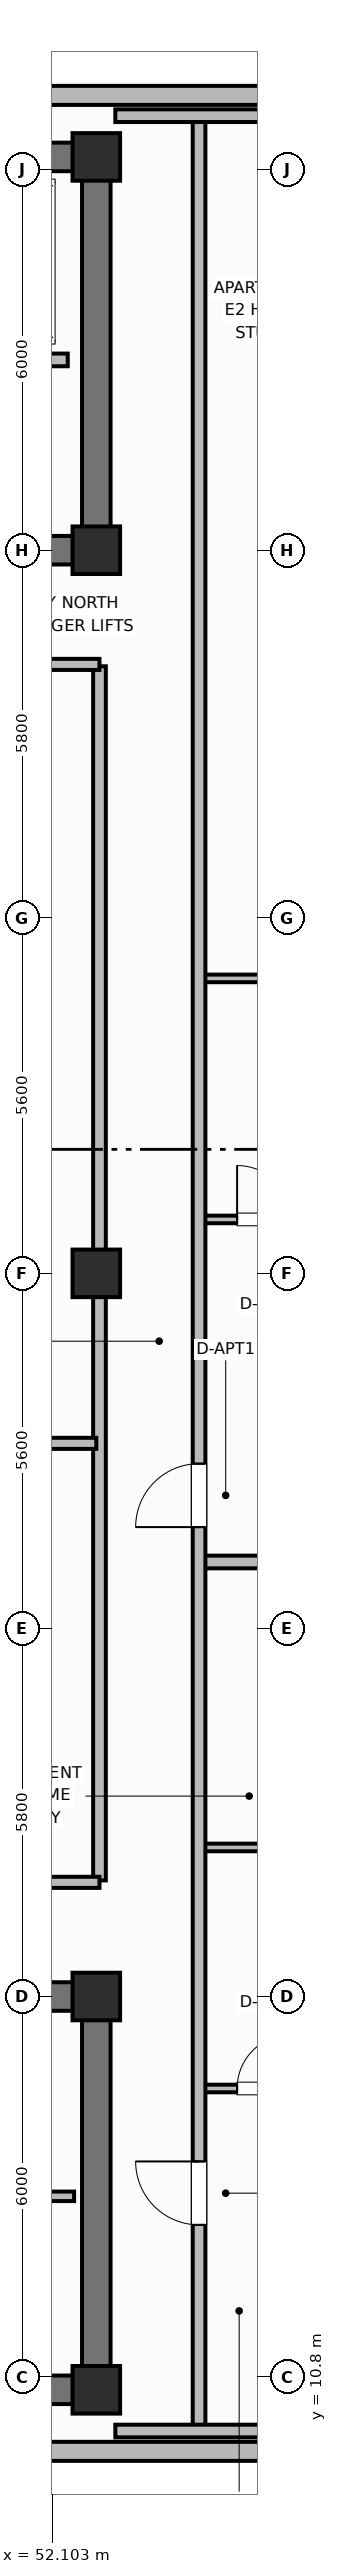
"""IFC4 building model, lengths in metres.
Left out: names, types, materials, properties, quantities, classifications, styles, units other than length and angle.
Written with IfcOpenShell. Run it as: python <this file> out.ifc"""

import sys

from ifc_helpers import new_model, si_unit, direction, frame, frame_2d, origin, origin_2d, place, context, subcontext, project, spatial, rectangle, extrude, element, fill, save


model = new_model("IFC4")
c1 = context("Model", 3, precision=1e-05, world=origin(), true_north=direction((0.0, 1.0)))
c2 = subcontext(c1, "Body", "Model", "MODEL_VIEW")
j1 = project(units=[si_unit("LENGTHUNIT", "METRE"), si_unit("PLANEANGLEUNIT", "RADIAN")], contexts=[c1])
p1 = place(None, origin())
s1 = spatial("IfcSite", under=j1, at=p1, CompositionType="ELEMENT")
p2 = place(p1, origin())
s2 = spatial("IfcBuilding", under=s1, at=p2, CompositionType="ELEMENT")
p3 = place(p2, frame((0.0, 0.0, 293.5)))
s3 = spatial("IfcBuildingStorey", under=s2, at=p3, CompositionType="ELEMENT", Elevation=293.5)
p4 = place(p3, frame((52.8, 10.6, 0.0), z_axis=(0.0, 0.0, 1.0), x_axis=(-1.0, 0.0, 0.0)))
e1 = element("IfcWall", 1, at=p4, inside=s3, PredefinedType="SHEAR", context=c2, shape_type="SweptSolid", body=[
    extrude(rectangle(XDim=27.2, YDim=0.45, at=frame_2d((13.6, 0.0))), origin(), (0.0, 0.0, 1.0), 3.7),
])
p5 = place(p3, frame((52.8, 10.825, 0.0), z_axis=(0.0, 0.0, 1.0), x_axis=(0.0, 1.0, 0.0)))
e2 = element("IfcWall", 2, at=p5, inside=s3, PredefinedType="SHEAR", context=c2, shape_type="SweptSolid", body=[
    extrude(rectangle(XDim=5.75, YDim=0.45, at=frame_2d((2.875, 0.0))), origin(), (0.0, 0.0, 1.0), 3.7),
])
p6 = place(p3, frame((25.6, 16.8, 0.0), z_axis=(0.0, 0.0, 1.0), x_axis=(1.0, 0.0, 0.0)))
e3 = element("IfcWall", 3, at=p6, inside=s3, PredefinedType="SHEAR", context=c2, shape_type="SweptSolid", body=[
    extrude(rectangle(XDim=27.2, YDim=0.45, at=frame_2d((13.6, 0.0))), origin(), (0.0, 0.0, 1.0), 3.7),
])
p7 = place(p6, frame((1.7, 0.0, 0.0)))
e4 = element("IfcOpeningElement", 4, at=p7, cuts=e3, PredefinedType="OPENING", context=c2, shape_type="SweptSolid", body=[
    extrude(rectangle(XDim=1.1, YDim=2.15, at=frame_2d((0.55, 1.075))), frame((0.0, 0.235, 0.0), z_axis=(0.0, -1.0, 0.0), x_axis=(1.0, 0.0, 0.0)), (0.0, 0.0, 1.0), 0.47),
])
p8 = place(p6, frame((4.45, 0.0, 0.0)))
e5 = element("IfcOpeningElement", 5, at=p8, cuts=e3, PredefinedType="OPENING", context=c2, shape_type="SweptSolid", body=[
    extrude(rectangle(XDim=0.85, YDim=2.1, at=frame_2d((0.425, 1.05))), frame((0.0, 0.235, 0.0), z_axis=(0.0, -1.0, 0.0), x_axis=(1.0, 0.0, 0.0)), (0.0, 0.0, 1.0), 0.47),
])
p9 = place(p6, frame((6.5, 0.0, 0.0)))
e6 = element("IfcOpeningElement", 6, at=p9, cuts=e3, PredefinedType="OPENING", context=c2, shape_type="SweptSolid", body=[
    extrude(rectangle(XDim=0.85, YDim=2.1, at=frame_2d((0.425, 1.05))), frame((0.0, 0.235, 0.0), z_axis=(0.0, -1.0, 0.0), x_axis=(1.0, 0.0, 0.0)), (0.0, 0.0, 1.0), 0.47),
])
p10 = place(p6, frame((13.0, 0.0, 0.0)))
e7 = element("IfcOpeningElement", 7, at=p10, cuts=e3, PredefinedType="OPENING", context=c2, shape_type="SweptSolid", body=[
    extrude(rectangle(XDim=1.2, YDim=2.15, at=frame_2d((0.6, 1.075))), frame((0.0, 0.235, 0.0), z_axis=(0.0, -1.0, 0.0), x_axis=(1.0, 0.0, 0.0)), (0.0, 0.0, 1.0), 0.47),
])
p11 = place(p6, frame((19.8, 0.0, 0.0)))
e8 = element("IfcOpeningElement", 8, at=p11, cuts=e3, PredefinedType="OPENING", context=c2, shape_type="SweptSolid", body=[
    extrude(rectangle(XDim=0.85, YDim=2.1, at=frame_2d((0.425, 1.05))), frame((0.0, 0.235, 0.0), z_axis=(0.0, -1.0, 0.0), x_axis=(1.0, 0.0, 0.0)), (0.0, 0.0, 1.0), 0.47),
])
p12 = place(p6, frame((24.2, 0.0, 0.0)))
e9 = element("IfcOpeningElement", 9, at=p12, cuts=e3, PredefinedType="OPENING", context=c2, shape_type="SweptSolid", body=[
    extrude(rectangle(XDim=0.85, YDim=2.1, at=frame_2d((0.425, 1.05))), frame((0.0, 0.235, 0.0), z_axis=(0.0, -1.0, 0.0), x_axis=(1.0, 0.0, 0.0)), (0.0, 0.0, 1.0), 0.47),
])
p13 = place(p3, frame((25.6, 45.8, 0.0), z_axis=(0.0, 0.0, 1.0), x_axis=(1.0, 0.0, 0.0)))
e10 = element("IfcWall", 10, at=p13, inside=s3, PredefinedType="SHEAR", context=c2, shape_type="SweptSolid", body=[
    extrude(rectangle(XDim=27.2, YDim=0.45, at=frame_2d((13.6, 0.0))), origin(), (0.0, 0.0, 1.0), 3.7),
])
p14 = place(p3, frame((52.8, 39.825, 0.0), z_axis=(0.0, 0.0, 1.0), x_axis=(0.0, 1.0, 0.0)))
e11 = element("IfcWall", 11, at=p14, inside=s3, PredefinedType="SHEAR", context=c2, shape_type="SweptSolid", body=[
    extrude(rectangle(XDim=5.75, YDim=0.45, at=frame_2d((2.875, 0.0))), origin(), (0.0, 0.0, 1.0), 3.7),
])
p15 = place(p3, frame((52.8, 39.6, 0.0), z_axis=(0.0, 0.0, 1.0), x_axis=(-1.0, 0.0, 0.0)))
e12 = element("IfcWall", 12, at=p15, inside=s3, PredefinedType="SHEAR", context=c2, shape_type="SweptSolid", body=[
    extrude(rectangle(XDim=27.2, YDim=0.45, at=frame_2d((13.6, 0.0))), origin(), (0.0, 0.0, 1.0), 3.7),
])
p16 = place(p15, frame((24.3, 0.0, 0.0)))
e13 = element("IfcOpeningElement", 13, at=p16, cuts=e12, PredefinedType="OPENING", context=c2, shape_type="SweptSolid", body=[
    extrude(rectangle(XDim=1.1, YDim=2.15, at=frame_2d((0.55, 1.075))), frame((0.0, 0.235, 0.0), z_axis=(0.0, -1.0, 0.0), x_axis=(1.0, 0.0, 0.0)), (0.0, 0.0, 1.0), 0.47),
])
p17 = place(p15, frame((21.85, 0.0, 0.0)))
e14 = element("IfcOpeningElement", 14, at=p17, cuts=e12, PredefinedType="OPENING", context=c2, shape_type="SweptSolid", body=[
    extrude(rectangle(XDim=0.85, YDim=2.1, at=frame_2d((0.425, 1.05))), frame((0.0, 0.235, 0.0), z_axis=(0.0, -1.0, 0.0), x_axis=(1.0, 0.0, 0.0)), (0.0, 0.0, 1.0), 0.47),
])
p18 = place(p15, frame((19.85, 0.0, 0.0)))
e15 = element("IfcOpeningElement", 15, at=p18, cuts=e12, PredefinedType="OPENING", context=c2, shape_type="SweptSolid", body=[
    extrude(rectangle(XDim=0.85, YDim=2.1, at=frame_2d((0.425, 1.05))), frame((0.0, 0.235, 0.0), z_axis=(0.0, -1.0, 0.0), x_axis=(1.0, 0.0, 0.0)), (0.0, 0.0, 1.0), 0.47),
])
p19 = place(p15, frame((15.1, 0.0, 0.0)))
e16 = element("IfcOpeningElement", 16, at=p19, cuts=e12, PredefinedType="OPENING", context=c2, shape_type="SweptSolid", body=[
    extrude(rectangle(XDim=1.2, YDim=2.15, at=frame_2d((0.6, 1.075))), frame((0.0, 0.235, 0.0), z_axis=(0.0, -1.0, 0.0), x_axis=(1.0, 0.0, 0.0)), (0.0, 0.0, 1.0), 0.47),
])
p20 = place(p15, frame((12.6, 0.0, 0.0)))
e17 = element("IfcOpeningElement", 17, at=p20, cuts=e12, PredefinedType="OPENING", context=c2, shape_type="SweptSolid", body=[
    extrude(rectangle(XDim=0.85, YDim=2.1, at=frame_2d((0.425, 1.05))), frame((0.0, 0.235, 0.0), z_axis=(0.0, -1.0, 0.0), x_axis=(1.0, 0.0, 0.0)), (0.0, 0.0, 1.0), 0.47),
])
p21 = place(p15, frame((10.85, 0.0, 0.0)))
e18 = element("IfcOpeningElement", 18, at=p21, cuts=e12, PredefinedType="OPENING", context=c2, shape_type="SweptSolid", body=[
    extrude(rectangle(XDim=0.85, YDim=2.1, at=frame_2d((0.425, 1.05))), frame((0.0, 0.235, 0.0), z_axis=(0.0, -1.0, 0.0), x_axis=(1.0, 0.0, 0.0)), (0.0, 0.0, 1.0), 0.47),
])
p22 = place(p15, frame((7.35, 0.0, 0.0)))
e19 = element("IfcOpeningElement", 19, at=p22, cuts=e12, PredefinedType="OPENING", context=c2, shape_type="SweptSolid", body=[
    extrude(rectangle(XDim=0.85, YDim=2.1, at=frame_2d((0.425, 1.05))), frame((0.0, 0.235, 0.0), z_axis=(0.0, -1.0, 0.0), x_axis=(1.0, 0.0, 0.0)), (0.0, 0.0, 1.0), 0.47),
])
p23 = place(p15, frame((4.2, 0.0, 0.0)))
e20 = element("IfcOpeningElement", 20, at=p23, cuts=e12, PredefinedType="OPENING", context=c2, shape_type="SweptSolid", body=[
    extrude(rectangle(XDim=1.3, YDim=2.2, at=frame_2d((0.65, 1.1))), frame((0.0, 0.235, 0.0), z_axis=(0.0, -1.0, 0.0), x_axis=(1.0, 0.0, 0.0)), (0.0, 0.0, 1.0), 0.47),
])
for number, where, z_axis, x_axis in (
    (21, (52.8, 10.6, 0.0), (0.0, 0.0, 1.0), (1.0, 0.0, 0.0)),
    (22, (52.8, 16.8, 0.0), (0.0, 0.0, 1.0), (1.0, 0.0, 0.0)),
    (23, (52.8, 39.6, 0.0), (0.0, 0.0, 1.0), (1.0, 0.0, 0.0)),
    (24, (52.8, 45.8, 0.0), (0.0, 0.0, 1.0), (1.0, 0.0, 0.0)),
    (25, (52.8, 28.2, 0.0), (0.0, 0.0, 1.0), (1.0, 0.0, 0.0)),
):
    element("IfcColumn", number, at=place(p3, frame(where, z_axis=z_axis, x_axis=x_axis)), inside=s3, PredefinedType="COLUMN", context=c2, shape_type="SweptSolid", body=[
        extrude(rectangle(XDim=0.75, YDim=0.75, at=origin_2d()), origin(), (0.0, 0.0, 1.0), 3.7),
    ])
p24 = place(p3, frame((30.21, 9.63, 0.0), z_axis=(0.0, 0.0, 1.0), x_axis=(1.0, 0.0, 0.0)))
e26 = element("IfcWall", 26, at=p24, inside=s3, PredefinedType="SOLIDWALL", context=c2, shape_type="SweptSolid", body=[
    extrude(rectangle(XDim=25.63, YDim=0.3, at=frame_2d((12.815, 0.0))), origin(), (0.0, 0.0, 1.0), 2.71),
])
p25 = place(p24, frame((1.338, 0.0, 0.69)))
e27 = element("IfcOpeningElement", 27, at=p25, cuts=e26, PredefinedType="OPENING", context=c2, shape_type="SweptSolid", body=[
    extrude(rectangle(XDim=2.1, YDim=1.9, at=frame_2d((1.05, 0.95))), frame((0.0, 0.16, 0.0), z_axis=(0.0, -1.0, 0.0), x_axis=(1.0, 0.0, 0.0)), (0.0, 0.0, 1.0), 0.32),
])
p26 = place(p24, frame((8.289, 0.0, 0.69)))
e28 = element("IfcOpeningElement", 28, at=p26, cuts=e26, PredefinedType="OPENING", context=c2, shape_type="SweptSolid", body=[
    extrude(rectangle(XDim=2.1, YDim=1.9, at=frame_2d((1.05, 0.95))), frame((0.0, 0.16, 0.0), z_axis=(0.0, -1.0, 0.0), x_axis=(1.0, 0.0, 0.0)), (0.0, 0.0, 1.0), 0.32),
])
p27 = place(p24, frame((15.241, 0.0, 0.69)))
e29 = element("IfcOpeningElement", 29, at=p27, cuts=e26, PredefinedType="OPENING", context=c2, shape_type="SweptSolid", body=[
    extrude(rectangle(XDim=2.1, YDim=1.9, at=frame_2d((1.05, 0.95))), frame((0.0, 0.16, 0.0), z_axis=(0.0, -1.0, 0.0), x_axis=(1.0, 0.0, 0.0)), (0.0, 0.0, 1.0), 0.32),
])
p28 = place(p24, frame((18.716, 0.0, 0.69)))
e30 = element("IfcOpeningElement", 30, at=p28, cuts=e26, PredefinedType="OPENING", context=c2, shape_type="SweptSolid", body=[
    extrude(rectangle(XDim=2.1, YDim=1.9, at=frame_2d((1.05, 0.95))), frame((0.0, 0.16, 0.0), z_axis=(0.0, -1.0, 0.0), x_axis=(1.0, 0.0, 0.0)), (0.0, 0.0, 1.0), 0.32),
])
p29 = place(p3, frame((55.84, 46.77, 0.0), z_axis=(0.0, 0.0, 1.0), x_axis=(-1.0, 0.0, 0.0)))
e31 = element("IfcWall", 31, at=p29, inside=s3, PredefinedType="SOLIDWALL", context=c2, shape_type="SweptSolid", body=[
    extrude(rectangle(XDim=4.45, YDim=0.3, at=frame_2d((2.225, 0.0))), origin(), (0.0, 0.0, 1.0), 2.71),
])
p30 = place(p3, frame((48.05, 13.65, 0.0), z_axis=(0.0, 0.0, 1.0), x_axis=(1.0, 0.0, 0.0)))
e32 = element("IfcWall", 32, at=p30, inside=s3, PredefinedType="PARTITIONING", context=c2, shape_type="SweptSolid", body=[
    extrude(rectangle(XDim=4.4, YDim=0.15, at=frame_2d((2.2, 0.0))), origin(), (0.0, 0.0, 1.0), 2.54),
])
p31 = place(p30, frame((1.6, 0.0, 0.0)))
e33 = element("IfcOpeningElement", 33, at=p31, cuts=e32, PredefinedType="OPENING", context=c2, shape_type="SweptSolid", body=[
    extrude(rectangle(XDim=0.85, YDim=2.1, at=frame_2d((0.425, 1.05))), frame((0.0, 0.085, 0.0), z_axis=(0.0, -1.0, 0.0), x_axis=(1.0, 0.0, 0.0)), (0.0, 0.0, 1.0), 0.17),
])
p32 = place(p3, frame((52.35, 42.6, 0.0), z_axis=(0.0, 0.0, 1.0), x_axis=(-1.0, 0.0, 0.0)))
e34 = element("IfcWall", 34, at=p32, inside=s3, PredefinedType="PARTITIONING", context=c2, shape_type="SweptSolid", body=[
    extrude(rectangle(XDim=6.5, YDim=0.2, at=frame_2d((3.25, 0.0))), origin(), (0.0, 0.0, 1.0), 2.54),
])
p33 = place(p32, frame((4.9, 0.0, 0.0)))
e35 = element("IfcOpeningElement", 35, at=p33, cuts=e34, PredefinedType="OPENING", context=c2, shape_type="SweptSolid", body=[
    extrude(rectangle(XDim=1.0, YDim=2.15, at=frame_2d((0.5, 1.075))), frame((0.0, 0.11, 0.0), z_axis=(0.0, -1.0, 0.0), x_axis=(1.0, 0.0, 0.0)), (0.0, 0.0, 1.0), 0.22),
])
p34 = place(p32, frame((2.8, 0.0, 0.0)))
e36 = element("IfcOpeningElement", 36, at=p34, cuts=e34, PredefinedType="OPENING", context=c2, shape_type="SweptSolid", body=[
    extrude(rectangle(XDim=1.0, YDim=2.15, at=frame_2d((0.5, 1.075))), frame((0.0, 0.11, 0.0), z_axis=(0.0, -1.0, 0.0), x_axis=(1.0, 0.0, 0.0)), (0.0, 0.0, 1.0), 0.22),
])
p35 = place(p32, frame((0.7, 0.0, 0.0)))
e37 = element("IfcOpeningElement", 37, at=p35, cuts=e34, PredefinedType="OPENING", context=c2, shape_type="SweptSolid", body=[
    extrude(rectangle(XDim=1.0, YDim=2.15, at=frame_2d((0.5, 1.075))), frame((0.0, 0.11, 0.0), z_axis=(0.0, -1.0, 0.0), x_axis=(1.0, 0.0, 0.0)), (0.0, 0.0, 1.0), 0.22),
])
p36 = place(p3, frame((52.85, 18.63, 0.0), z_axis=(0.0, 0.0, 1.0), x_axis=(0.0, 1.0, 0.0)))
e38 = element("IfcWall", 38, at=p36, inside=s3, PredefinedType="PARTITIONING", context=c2, shape_type="SweptSolid", body=[
    extrude(rectangle(XDim=19.14, YDim=0.2, at=frame_2d((9.57, 0.0))), origin(), (0.0, 0.0, 1.0), 2.54),
])
for number, where, z_axis, x_axis in (
    (39, (29.9, 18.6, 0.0), (0.0, 0.0, 1.0), (1.0, 0.0, 0.0)),
    (40, (29.9, 37.8, 0.0), (0.0, 0.0, 1.0), (1.0, 0.0, 0.0)),
):
    element("IfcWall", number, at=place(p3, frame(where, z_axis=z_axis, x_axis=x_axis)), inside=s3, PredefinedType="PARTITIONING", context=c2, shape_type="SweptSolid", body=[
        extrude(rectangle(XDim=22.95, YDim=0.175, at=frame_2d((11.475, 0.0))), origin(), (0.0, 0.0, 1.0), 2.54),
    ])
p37 = place(p3, frame((29.93, 25.521, 0.0), z_axis=(0.0, 0.0, 1.0), x_axis=(1.0, 0.0, 0.0)))
e41 = element("IfcWall", 41, at=p37, inside=s3, PredefinedType="PARTITIONING", context=c2, shape_type="SweptSolid", body=[
    extrude(rectangle(XDim=22.87, YDim=0.175, at=frame_2d((11.435, 0.0))), origin(), (0.0, 0.0, 1.0), 2.54),
])
p38 = place(p3, frame((54.42, 15.35, 0.0), z_axis=(0.0, 0.0, 1.0), x_axis=(1.0, 0.0, 0.0)))
e42 = element("IfcWall", 42, at=p38, inside=s3, PredefinedType="PARTITIONING", context=c2, shape_type="SweptSolid", body=[
    extrude(rectangle(XDim=1.95, YDim=0.12, at=frame_2d((0.975, 0.0))), origin(), (0.0, 0.0, 1.0), 2.54),
])
p39 = place(p38, frame((0.6, 0.0, 0.0)))
e43 = element("IfcOpeningElement", 43, at=p39, cuts=e42, PredefinedType="OPENING", context=c2, shape_type="SweptSolid", body=[
    extrude(rectangle(XDim=0.85, YDim=2.1, at=frame_2d((0.425, 1.05))), frame((0.0, 0.07, 0.0), z_axis=(0.0, -1.0, 0.0), x_axis=(1.0, 0.0, 0.0)), (0.0, 0.0, 1.0), 0.14),
])
p40 = place(p3, frame((54.42, 19.15, 0.0), z_axis=(0.0, 0.0, 1.0), x_axis=(1.0, 0.0, 0.0)))
e44 = element("IfcWall", 44, at=p40, inside=s3, PredefinedType="PARTITIONING", context=c2, shape_type="SweptSolid", body=[
    extrude(rectangle(XDim=1.95, YDim=0.12, at=frame_2d((0.975, 0.0))), origin(), (0.0, 0.0, 1.0), 2.54),
])
p41 = place(p3, frame((54.42, 23.65, 0.0), z_axis=(0.0, 0.0, 1.0), x_axis=(1.0, 0.0, 0.0)))
e45 = element("IfcWall", 45, at=p41, inside=s3, PredefinedType="PARTITIONING", context=c2, shape_type="SweptSolid", body=[
    extrude(rectangle(XDim=4.45, YDim=0.2, at=frame_2d((2.225, 0.0))), origin(), (0.0, 0.0, 1.0), 2.54),
])
p42 = place(p3, frame((54.42, 29.05, 0.0), z_axis=(0.0, 0.0, 1.0), x_axis=(1.0, 0.0, 0.0)))
e46 = element("IfcWall", 46, at=p42, inside=s3, PredefinedType="PARTITIONING", context=c2, shape_type="SweptSolid", body=[
    extrude(rectangle(XDim=1.95, YDim=0.12, at=frame_2d((0.975, 0.0))), origin(), (0.0, 0.0, 1.0), 2.54),
])
p43 = place(p42, frame((0.6, 0.0, 0.0)))
e47 = element("IfcOpeningElement", 47, at=p43, cuts=e46, PredefinedType="OPENING", context=c2, shape_type="SweptSolid", body=[
    extrude(rectangle(XDim=0.85, YDim=2.1, at=frame_2d((0.425, 1.05))), frame((0.0, 0.07, 0.0), z_axis=(0.0, -1.0, 0.0), x_axis=(1.0, 0.0, 0.0)), (0.0, 0.0, 1.0), 0.14),
])
p44 = place(p3, frame((54.42, 32.85, 0.0), z_axis=(0.0, 0.0, 1.0), x_axis=(1.0, 0.0, 0.0)))
e48 = element("IfcWall", 48, at=p44, inside=s3, PredefinedType="PARTITIONING", context=c2, shape_type="SweptSolid", body=[
    extrude(rectangle(XDim=1.95, YDim=0.12, at=frame_2d((0.975, 0.0))), origin(), (0.0, 0.0, 1.0), 2.54),
])
p45 = place(p3, frame((54.42, 9.95, 0.0), z_axis=(0.0, 0.0, 1.0), x_axis=(0.0, 1.0, 0.0)))
e49 = element("IfcWall", 49, at=p45, inside=s3, PredefinedType="PARTITIONING", context=c2, shape_type="SweptSolid", body=[
    extrude(rectangle(XDim=36.5, YDim=0.2, at=frame_2d((18.25, 0.0))), origin(), (0.0, 0.0, 1.0), 2.54),
])
p46 = place(p45, frame((3.25, 0.0, 0.0)))
e50 = element("IfcOpeningElement", 50, at=p46, cuts=e49, PredefinedType="OPENING", context=c2, shape_type="SweptSolid", body=[
    extrude(rectangle(XDim=1.0, YDim=2.15, at=frame_2d((0.5, 1.075))), frame((0.0, 0.11, 0.0), z_axis=(0.0, -1.0, 0.0), x_axis=(1.0, 0.0, 0.0)), (0.0, 0.0, 1.0), 0.22),
])
p47 = place(p45, frame((14.25, 0.0, 0.0)))
e51 = element("IfcOpeningElement", 51, at=p47, cuts=e49, PredefinedType="OPENING", context=c2, shape_type="SweptSolid", body=[
    extrude(rectangle(XDim=1.0, YDim=2.15, at=frame_2d((0.5, 1.075))), frame((0.0, 0.11, 0.0), z_axis=(0.0, -1.0, 0.0), x_axis=(1.0, 0.0, 0.0)), (0.0, 0.0, 1.0), 0.22),
])
for number, where, z_axis, x_axis in (
    (52, (53.1, 9.95, 0.0), (0.0, 0.0, 1.0), (1.0, 0.0, 0.0)),
    (53, (53.1, 46.45, 0.0), (0.0, 0.0, 1.0), (1.0, 0.0, 0.0)),
):
    element("IfcWall", number, at=place(p3, frame(where, z_axis=z_axis, x_axis=x_axis)), inside=s3, PredefinedType="PARTITIONING", context=c2, shape_type="SweptSolid", body=[
        extrude(rectangle(XDim=3.754, YDim=0.2, at=frame_2d((1.877, 0.0))), origin(), (0.0, 0.0, 1.0), 2.54),
    ])
p48 = place(p39, origin())
e54 = element("IfcDoor", 54, at=p48, inside=s3, OperationType="SINGLE_SWING_RIGHT", PredefinedType="DOOR", context=c2, shape_type="SweptSolid", body=[
    extrude(rectangle(XDim=0.85, YDim=2.1, at=frame_2d((0.425, 1.05))), frame((0.0, 0.025, 0.0), z_axis=(0.0, -1.0, 0.0), x_axis=(1.0, 0.0, 0.0)), (0.0, 0.0, 1.0), 0.05),
])
fill(e43, e54)
p49 = place(p43, origin())
e55 = element("IfcDoor", 55, at=p49, inside=s3, OperationType="SINGLE_SWING_LEFT", PredefinedType="DOOR", context=c2, shape_type="SweptSolid", body=[
    extrude(rectangle(XDim=0.85, YDim=2.1, at=frame_2d((0.425, 1.05))), frame((0.0, 0.025, 0.0), z_axis=(0.0, -1.0, 0.0), x_axis=(1.0, 0.0, 0.0)), (0.0, 0.0, 1.0), 0.05),
])
fill(e47, e55)
p50 = place(p46, origin())
e56 = element("IfcDoor", 56, at=p50, inside=s3, OperationType="SINGLE_SWING_RIGHT", PredefinedType="DOOR", context=c2, shape_type="SweptSolid", body=[
    extrude(rectangle(XDim=1.0, YDim=2.15, at=frame_2d((0.5, 1.075))), frame((0.0, 0.025, 0.0), z_axis=(0.0, -1.0, 0.0), x_axis=(1.0, 0.0, 0.0)), (0.0, 0.0, 1.0), 0.05),
])
fill(e50, e56)
p51 = place(p47, origin())
e57 = element("IfcDoor", 57, at=p51, inside=s3, OperationType="SINGLE_SWING_LEFT", PredefinedType="DOOR", context=c2, shape_type="SweptSolid", body=[
    extrude(rectangle(XDim=1.0, YDim=2.15, at=frame_2d((0.5, 1.075))), frame((0.0, 0.025, 0.0), z_axis=(0.0, -1.0, 0.0), x_axis=(1.0, 0.0, 0.0)), (0.0, 0.0, 1.0), 0.05),
])
fill(e51, e57)
save(model, sys.argv[1])
